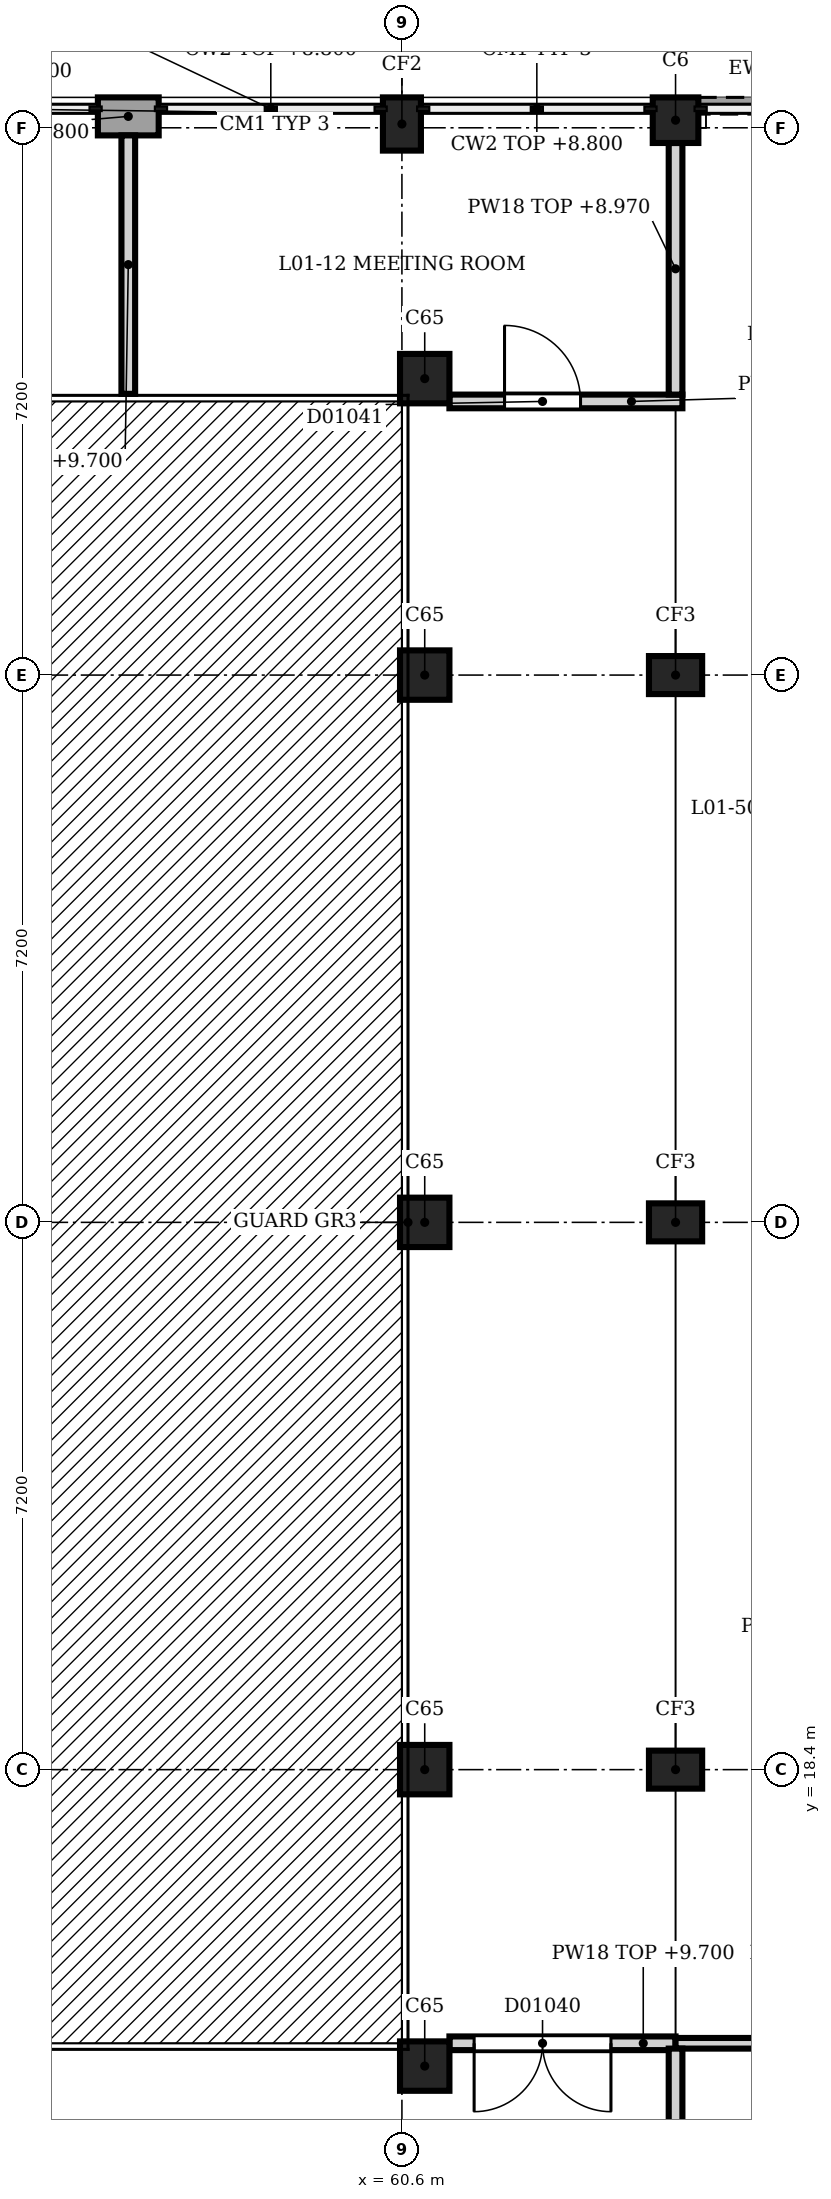
"""IFC4 building model, lengths in metres.
Left out: names, types, materials, properties, quantities, classifications, styles, units other than length and angle.
Written with IfcOpenShell. Run it as: python <this file> out.ifc"""

import sys

from ifc_helpers import new_model, si_unit, direction, frame, frame_2d, origin, origin_2d, place, context, subcontext, project, spatial, rectangle, extrude, element, fill, save


model = new_model("IFC4")
c1 = context("Model", 3, precision=1e-05, world=origin(), true_north=direction((0.0, 1.0)))
c2 = subcontext(c1, "Body", "Model", "MODEL_VIEW")
j1 = project(units=[si_unit("LENGTHUNIT", "METRE"), si_unit("PLANEANGLEUNIT", "RADIAN")], contexts=[c1])
p1 = place(None, origin())
s1 = spatial("IfcSite", under=j1, at=p1, CompositionType="ELEMENT")
p2 = place(p1, origin())
s2 = spatial("IfcBuilding", under=s1, at=p2, CompositionType="ELEMENT")
p3 = place(p2, frame((0.0, 0.0, 5.4)))
s3 = spatial("IfcBuildingStorey", under=s2, at=p3, CompositionType="ELEMENT", Elevation=5.4)
p4 = place(p3, frame((60.6, 40.05, 0.0), z_axis=(0.0, 0.0, 1.0), x_axis=(1.0, 0.0, 0.0)))
e1 = element("IfcColumn", 1, at=p4, inside=s3, PredefinedType="COLUMN", context=c2, shape_type="SweptSolid", body=[
    extrude(rectangle(XDim=0.5, YDim=0.7, at=origin_2d()), origin(), (0.0, 0.0, 1.0), 4.5),
])
for number, where, z_axis, x_axis in (
    (2, (64.2, 18.4, 0.0), (0.0, 0.0, 1.0), (1.0, 0.0, 0.0)),
    (3, (64.2, 25.6, 0.0), (0.0, 0.0, 1.0), (1.0, 0.0, 0.0)),
    (4, (64.2, 32.8, 0.0), (0.0, 0.0, 1.0), (1.0, 0.0, 0.0)),
):
    element("IfcColumn", number, at=place(p3, frame(where, z_axis=z_axis, x_axis=x_axis)), inside=s3, PredefinedType="COLUMN", context=c2, shape_type="SweptSolid", body=[
        extrude(rectangle(XDim=0.7, YDim=0.5, at=origin_2d()), origin(), (0.0, 0.0, 1.0), 4.5),
    ])
p5 = place(p3, frame((64.2, 40.1, 0.0), z_axis=(0.0, 0.0, 1.0), x_axis=(1.0, 0.0, 0.0)))
e5 = element("IfcColumn", 5, at=p5, inside=s3, PredefinedType="COLUMN", context=c2, shape_type="SweptSolid", body=[
    extrude(rectangle(XDim=0.6, YDim=0.6, at=origin_2d()), origin(), (0.0, 0.0, 1.0), 4.5),
])
for number, where, z_axis, x_axis in (
    (6, (60.9, 14.5, 0.0), (0.0, 0.0, 1.0), (1.0, 0.0, 0.0)),
    (7, (60.9, 18.4, 0.0), (0.0, 0.0, 1.0), (1.0, 0.0, 0.0)),
    (8, (60.9, 25.6, 0.0), (0.0, 0.0, 1.0), (1.0, 0.0, 0.0)),
    (9, (60.9, 32.8, 0.0), (0.0, 0.0, 1.0), (1.0, 0.0, 0.0)),
    (10, (60.9, 36.7, 0.0), (0.0, 0.0, 1.0), (1.0, 0.0, 0.0)),
):
    element("IfcColumn", number, at=place(p3, frame(where, z_axis=z_axis, x_axis=x_axis)), inside=s3, PredefinedType="COLUMN", context=c2, shape_type="SweptSolid", body=[
        extrude(rectangle(XDim=0.65, YDim=0.65, at=origin_2d()), origin(), (0.0, 0.0, 1.0), 4.5),
    ])
p6 = place(p3, frame((56.6, 40.15, 0.0), z_axis=(0.0, 0.0, 1.0), x_axis=(1.0, 0.0, 0.0)))
e11 = element("IfcWall", 11, at=p6, inside=s3, PredefinedType="SOLIDWALL", context=c2, shape_type="SweptSolid", body=[
    extrude(rectangle(XDim=0.8, YDim=0.5, at=frame_2d((0.4, 0.0))), origin(), (0.0, 0.0, 1.0), 3.4),
])
p7 = place(p3, frame((64.5, 40.29, 0.0), z_axis=(0.0, 0.0, 1.0), x_axis=(1.0, 0.0, 0.0)))
e12 = element("IfcWall", 12, at=p7, inside=s3, PredefinedType="SOLIDWALL", context=c2, shape_type="SweptSolid", body=[
    extrude(rectangle(XDim=3.05, YDim=0.22, at=frame_2d((1.525, 0.0))), origin(), (0.0, 0.0, 1.0), 0.9),
])
p8 = place(p3, frame((61.225, 14.8, 0.0), z_axis=(0.0, 0.0, 1.0), x_axis=(1.0, 0.0, 0.0)))
e13 = element("IfcWall", 13, at=p8, inside=s3, PredefinedType="PARTITIONING", context=c2, shape_type="SweptSolid", body=[
    extrude(rectangle(XDim=2.975, YDim=0.18, at=frame_2d((1.487, 0.0))), origin(), (0.0, 0.0, 1.0), 4.3),
])
p9 = place(p8, frame((0.325, 0.0, 0.0)))
e14 = element("IfcOpeningElement", 14, at=p9, cuts=e13, PredefinedType="OPENING", context=c2, shape_type="SweptSolid", body=[
    extrude(rectangle(XDim=1.8, YDim=2.3, at=frame_2d((0.9, 1.15))), frame((0.0, 0.1, 0.0), z_axis=(0.0, -1.0, 0.0), x_axis=(1.0, 0.0, 0.0)), (0.0, 0.0, 1.0), 0.2),
])
p10 = place(p3, frame((67.8, 14.8, 0.0), z_axis=(0.0, 0.0, 1.0), x_axis=(-1.0, 0.0, 0.0)))
e15 = element("IfcWall", 15, at=p10, inside=s3, PredefinedType="PARTITIONING", context=c2, shape_type="SweptSolid", body=[
    extrude(rectangle(XDim=3.6, YDim=0.14, at=frame_2d((1.8, 0.0))), origin(), (0.0, 0.0, 1.0), 4.3),
])
p11 = place(p10, frame((1.25, 0.0, 0.0)))
e16 = element("IfcOpeningElement", 16, at=p11, cuts=e15, PredefinedType="OPENING", context=c2, shape_type="SweptSolid", body=[
    extrude(rectangle(XDim=1.1, YDim=2.2, at=frame_2d((0.55, 1.1))), frame((0.0, 0.08, 0.0), z_axis=(0.0, -1.0, 0.0), x_axis=(1.0, 0.0, 0.0)), (0.0, 0.0, 1.0), 0.16),
])
p12 = place(p3, frame((61.225, 36.4, 0.0), z_axis=(0.0, 0.0, 1.0), x_axis=(1.0, 0.0, 0.0)))
e17 = element("IfcWall", 17, at=p12, inside=s3, PredefinedType="PARTITIONING", context=c2, shape_type="SweptSolid", body=[
    extrude(rectangle(XDim=3.065, YDim=0.18, at=frame_2d((1.532, 0.0))), origin(), (0.0, 0.0, 1.0), 4.3),
])
p13 = place(p12, frame((0.725, 0.0, 0.0)))
e18 = element("IfcOpeningElement", 18, at=p13, cuts=e17, PredefinedType="OPENING", context=c2, shape_type="SweptSolid", body=[
    extrude(rectangle(XDim=1.0, YDim=2.1, at=frame_2d((0.5, 1.05))), frame((0.0, 0.1, 0.0), z_axis=(0.0, -1.0, 0.0), x_axis=(1.0, 0.0, 0.0)), (0.0, 0.0, 1.0), 0.2),
])
p14 = place(p3, frame((57.0, 36.5, 0.0), z_axis=(0.0, 0.0, 1.0), x_axis=(0.0, 1.0, 0.0)))
e19 = element("IfcWall", 19, at=p14, inside=s3, PredefinedType="PARTITIONING", context=c2, shape_type="SweptSolid", body=[
    extrude(rectangle(XDim=3.4, YDim=0.18, at=frame_2d((1.7, 0.0))), origin(), (0.0, 0.0, 1.0), 4.3),
])
p15 = place(p3, frame((64.2, 11.4, 0.0), z_axis=(0.0, 0.0, 1.0), x_axis=(0.0, 1.0, 0.0)))
e20 = element("IfcWall", 20, at=p15, inside=s3, PredefinedType="PARTITIONING", context=c2, shape_type="SweptSolid", body=[
    extrude(rectangle(XDim=3.33, YDim=0.18, at=frame_2d((1.665, 0.0))), origin(), (0.0, 0.0, 1.0), 3.57),
])
p16 = place(p3, frame((64.2, 36.49, 0.0), z_axis=(0.0, 0.0, 1.0), x_axis=(0.0, 1.0, 0.0)))
e21 = element("IfcWall", 21, at=p16, inside=s3, PredefinedType="PARTITIONING", context=c2, shape_type="SweptSolid", body=[
    extrude(rectangle(XDim=3.31, YDim=0.18, at=frame_2d((1.655, 0.0))), origin(), (0.0, 0.0, 1.0), 3.57),
])
p17 = place(p9, origin())
e22 = element("IfcDoor", 22, at=p17, inside=s3, OperationType="SINGLE_SWING_LEFT", PredefinedType="DOOR", context=c2, shape_type="SweptSolid", body=[
    extrude(rectangle(XDim=1.8, YDim=2.3, at=frame_2d((0.9, 1.15))), frame((0.0, 0.025, 0.0), z_axis=(0.0, -1.0, 0.0), x_axis=(1.0, 0.0, 0.0)), (0.0, 0.0, 1.0), 0.05),
])
fill(e14, e22)
p18 = place(p13, origin())
e23 = element("IfcDoor", 23, at=p18, inside=s3, OperationType="SINGLE_SWING_LEFT", PredefinedType="DOOR", context=c2, shape_type="SweptSolid", body=[
    extrude(rectangle(XDim=1.0, YDim=2.1, at=frame_2d((0.5, 1.05))), frame((0.0, 0.025, 0.0), z_axis=(0.0, -1.0, 0.0), x_axis=(1.0, 0.0, 0.0)), (0.0, 0.0, 1.0), 0.05),
])
fill(e18, e23)
save(model, sys.argv[1])
